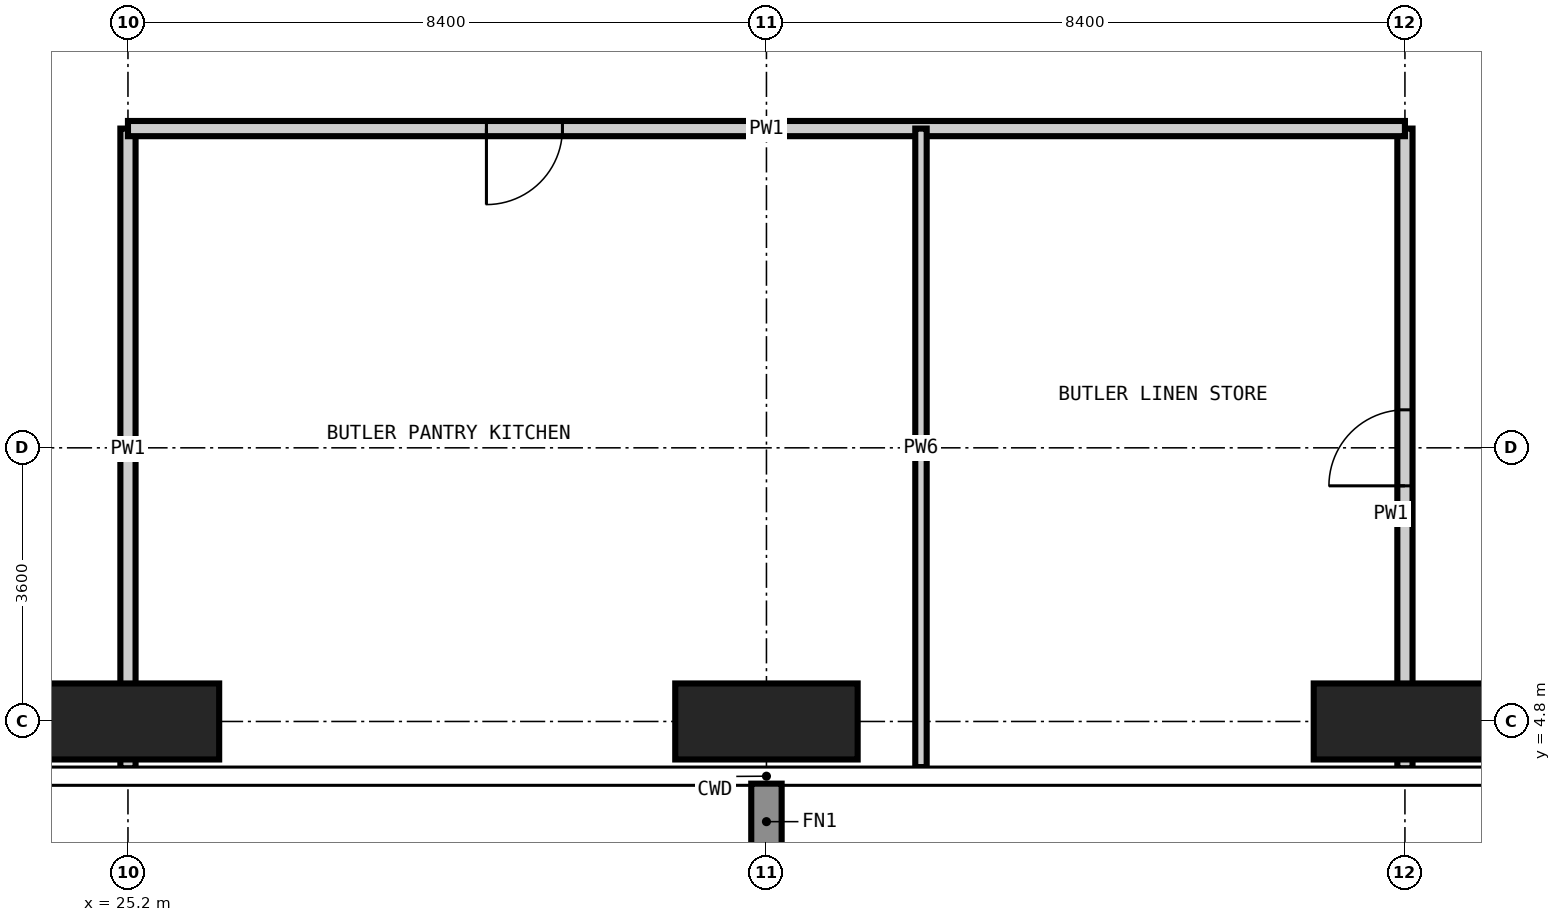
"""IFC4 building model, lengths in metres.
Left out: names, types, materials, properties, quantities, classifications, styles, units other than length and angle.
Written with IfcOpenShell. Run it as: python <this file> out.ifc"""

import sys

from ifc_helpers import new_model, si_unit, direction, frame, frame_2d, origin, origin_2d, place, context, subcontext, project, spatial, rectangle, extrude, element, fill, save


model = new_model("IFC4")
c1 = context("Model", 3, precision=1e-05, world=origin(), true_north=direction((0.0, 1.0)))
c2 = subcontext(c1, "Body", "Model", "MODEL_VIEW")
j1 = project(units=[si_unit("LENGTHUNIT", "METRE"), si_unit("PLANEANGLEUNIT", "RADIAN")], contexts=[c1])
p1 = place(None, origin())
s1 = spatial("IfcSite", under=j1, at=p1, CompositionType="ELEMENT")
p2 = place(p1, origin())
s2 = spatial("IfcBuilding", under=s1, at=p2, CompositionType="ELEMENT")
p3 = place(p2, frame((0.0, 0.0, 289.1)))
s3 = spatial("IfcBuildingStorey", under=s2, at=p3, CompositionType="ELEMENT", Elevation=289.1)
for number, where, z_axis, x_axis in (
    (1, (25.2, 4.8, -0.35), (0.0, 0.0, 1.0), (1.0, 0.0, 0.0)),
    (2, (33.6, 4.8, -0.35), (0.0, 0.0, 1.0), (1.0, 0.0, 0.0)),
    (3, (42.0, 4.8, -0.35), (0.0, 0.0, 1.0), (1.0, 0.0, 0.0)),
):
    element("IfcColumn", number, at=place(p3, frame(where, z_axis=z_axis, x_axis=x_axis)), inside=s3, PredefinedType="COLUMN", context=c2, shape_type="SweptSolid", body=[
        extrude(rectangle(XDim=2.4, YDim=1.0, at=origin_2d()), origin(), (0.0, 0.0, 1.0), 4.5),
    ])
p4 = place(p3, frame((25.2, 4.182, 0.0), z_axis=(0.0, 0.0, 1.0), x_axis=(0.0, 1.0, 0.0)))
e4 = element("IfcWall", 4, at=p4, inside=s3, PredefinedType="PARTITIONING", context=c2, shape_type="SweptSolid", body=[
    extrude(rectangle(XDim=8.418, YDim=0.2, at=frame_2d((4.209, 0.0))), origin(), (0.0, 0.0, 1.0), 4.15),
])
p5 = place(p3, frame((42.0, 4.182, 0.0), z_axis=(0.0, 0.0, 1.0), x_axis=(0.0, 1.0, 0.0)))
e5 = element("IfcWall", 5, at=p5, inside=s3, PredefinedType="PARTITIONING", context=c2, shape_type="SweptSolid", body=[
    extrude(rectangle(XDim=8.418, YDim=0.2, at=frame_2d((4.209, 0.0))), origin(), (0.0, 0.0, 1.0), 4.15),
])
p6 = place(p5, frame((3.718, 0.0, 0.0)))
e6 = element("IfcOpeningElement", 6, at=p6, cuts=e5, PredefinedType="OPENING", context=c2, shape_type="SweptSolid", body=[
    extrude(rectangle(XDim=1.0, YDim=2.1, at=frame_2d((0.5, 1.05))), frame((0.0, 0.11, 0.0), z_axis=(0.0, -1.0, 0.0), x_axis=(1.0, 0.0, 0.0)), (0.0, 0.0, 1.0), 0.22),
])
p7 = place(p3, frame((25.2, 12.6, 0.0), z_axis=(0.0, 0.0, 1.0), x_axis=(1.0, 0.0, 0.0)))
e7 = element("IfcWall", 7, at=p7, inside=s3, PredefinedType="PARTITIONING", context=c2, shape_type="SweptSolid", body=[
    extrude(rectangle(XDim=16.8, YDim=0.2, at=frame_2d((8.4, 0.0))), origin(), (0.0, 0.0, 1.0), 4.15),
])
p8 = place(p7, frame((4.716, 0.0, 0.0)))
e8 = element("IfcOpeningElement", 8, at=p8, cuts=e7, PredefinedType="OPENING", context=c2, shape_type="SweptSolid", body=[
    extrude(rectangle(XDim=1.0, YDim=2.1, at=frame_2d((0.5, 1.05))), frame((0.0, 0.11, 0.0), z_axis=(0.0, -1.0, 0.0), x_axis=(1.0, 0.0, 0.0)), (0.0, 0.0, 1.0), 0.22),
])
p9 = place(p3, frame((35.633, 4.2, 0.0), z_axis=(0.0, 0.0, 1.0), x_axis=(0.0, 1.0, 0.0)))
e9 = element("IfcWall", 9, at=p9, inside=s3, PredefinedType="PARTITIONING", context=c2, shape_type="SweptSolid", body=[
    extrude(rectangle(XDim=8.4, YDim=0.15, at=frame_2d((4.2, 0.0))), origin(), (0.0, 0.0, 1.0), 4.15),
])
p10 = place(p8, frame((1.0, 0.0, 0.0), z_axis=(0.0, 0.0, 1.0), x_axis=(-1.0, 0.0, 0.0)))
e10 = element("IfcDoor", 10, at=p10, inside=s3, OperationType="SINGLE_SWING_RIGHT", PredefinedType="DOOR", context=c2, shape_type="SweptSolid", body=[
    extrude(rectangle(XDim=1.0, YDim=2.1, at=frame_2d((0.5, 1.05))), frame((0.0, 0.025, 0.0), z_axis=(0.0, -1.0, 0.0), x_axis=(1.0, 0.0, 0.0)), (0.0, 0.0, 1.0), 0.05),
])
fill(e8, e10)
p11 = place(p6, origin())
e11 = element("IfcDoor", 11, at=p11, inside=s3, OperationType="SINGLE_SWING_LEFT", PredefinedType="DOOR", context=c2, shape_type="SweptSolid", body=[
    extrude(rectangle(XDim=1.0, YDim=2.1, at=frame_2d((0.5, 1.05))), frame((0.0, 0.025, 0.0), z_axis=(0.0, -1.0, 0.0), x_axis=(1.0, 0.0, 0.0)), (0.0, 0.0, 1.0), 0.05),
])
fill(e6, e11)
save(model, sys.argv[1])
